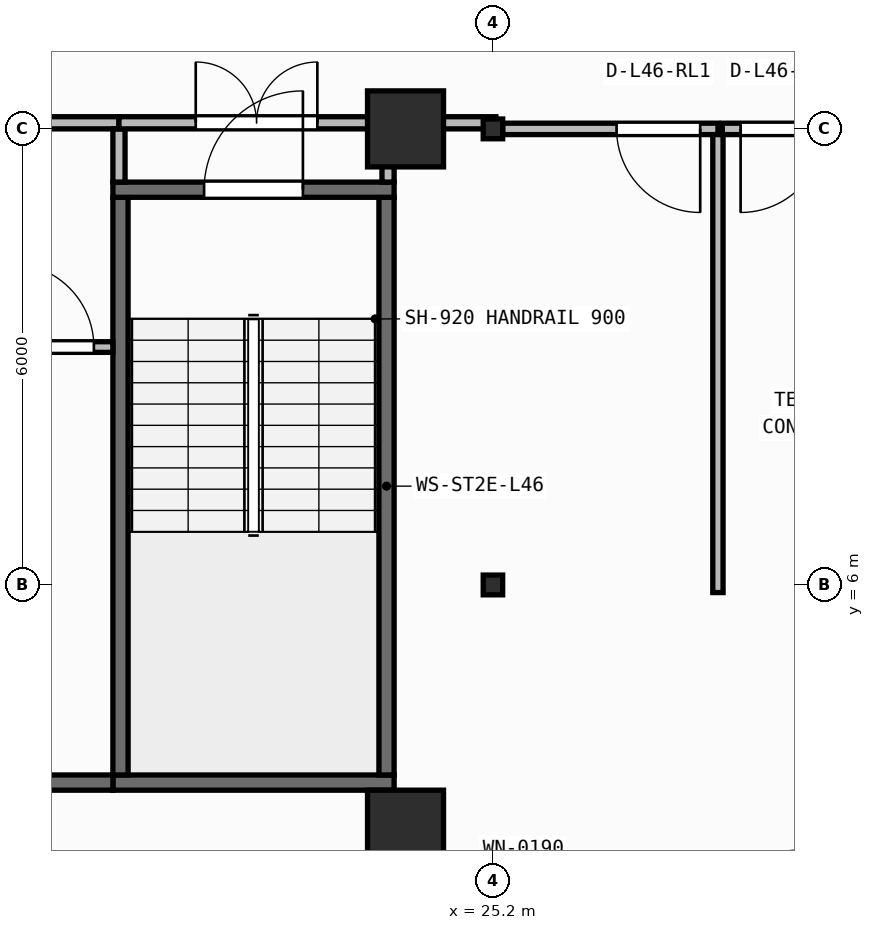
"""IFC4 building model, lengths in metres.
Left out: names, types, materials, properties, quantities, classifications, styles, units other than length and angle.
Written with IfcOpenShell. Run it as: python <this file> out.ifc"""

import sys

from ifc_helpers import new_model, si_unit, direction, frame, frame_2d, origin, origin_2d, place, context, subcontext, project, spatial, rectangle, i_section, extrude, element, fill, save


model = new_model("IFC4")
c1 = context("Model", 3, precision=1e-05, world=origin(), true_north=direction((0.0, 1.0)))
c2 = subcontext(c1, "Body", "Model", "MODEL_VIEW")
j1 = project(units=[si_unit("LENGTHUNIT", "METRE"), si_unit("PLANEANGLEUNIT", "RADIAN")], contexts=[c1])
p1 = place(None, origin())
s1 = spatial("IfcSite", under=j1, at=p1, CompositionType="ELEMENT")
p2 = place(p1, origin())
s2 = spatial("IfcBuilding", under=s1, at=p2, CompositionType="ELEMENT")
p3 = place(p2, frame((0.0, 0.0, 188.15)))
s3 = spatial("IfcBuildingStorey", under=s2, at=p3, CompositionType="ELEMENT", Elevation=188.15)
p4 = place(p3, frame((24.05, 2.8, 0.0), z_axis=(0.0, 0.0, 1.0), x_axis=(1.0, 0.0, 0.0)))
e1 = element("IfcColumn", 1, at=p4, inside=s3, PredefinedType="COLUMN", context=c2, shape_type="SweptSolid", body=[
    extrude(rectangle(XDim=1.0, YDim=1.0, at=origin_2d()), origin(), (0.0, 0.0, 1.0), 3.95),
])
p5 = place(p3, frame((25.2, 6.0, 0.0), z_axis=(0.0, 0.0, 1.0), x_axis=(1.0, 0.0, 0.0)))
e2 = element("IfcColumn", 2, at=p5, inside=s3, PredefinedType="COLUMN", context=c2, shape_type="SweptSolid", body=[
    extrude(i_section(OverallWidth=0.256, OverallDepth=0.26, WebThickness=0.01, FlangeThickness=0.017, FilletRadius=0.013, at=origin_2d()), origin(), (0.0, 0.0, 1.0), 3.95),
])
p6 = place(p3, frame((24.05, 12.0, 0.0), z_axis=(0.0, 0.0, 1.0), x_axis=(1.0, 0.0, 0.0)))
e3 = element("IfcColumn", 3, at=p6, inside=s3, PredefinedType="COLUMN", context=c2, shape_type="SweptSolid", body=[
    extrude(rectangle(XDim=1.0, YDim=1.0, at=origin_2d()), origin(), (0.0, 0.0, 1.0), 3.95),
])
p7 = place(p3, frame((25.2, 12.0, 0.0), z_axis=(0.0, 0.0, 1.0), x_axis=(1.0, 0.0, 0.0)))
e4 = element("IfcColumn", 4, at=p7, inside=s3, PredefinedType="COLUMN", context=c2, shape_type="SweptSolid", body=[
    extrude(i_section(OverallWidth=0.256, OverallDepth=0.26, WebThickness=0.01, FlangeThickness=0.017, FilletRadius=0.013, at=origin_2d()), origin(), (0.0, 0.0, 1.0), 3.95),
])
p8 = place(p3, frame((2.66, 0.174, 0.0), z_axis=(0.0, 0.0, 1.0), x_axis=(0.996634028439, 0.081979347142, 0.0)))
e5 = element("IfcWall", 5, at=p8, inside=s3, PredefinedType="STANDARD", context=c2, shape_type="SweptSolid", body=[
    extrude(rectangle(XDim=46.035, YDim=0.26, at=frame_2d((23.018, 0.0))), origin(), (0.0, 0.0, 1.0), 3.71),
])
p9 = place(p8, frame((21.817, 0.0, 0.9)))
e6 = element("IfcOpeningElement", 6, at=p9, cuts=e5, PredefinedType="OPENING", context=c2, shape_type="SweptSolid", body=[
    extrude(rectangle(XDim=2.4, YDim=1.65, at=frame_2d((1.2, 0.825))), frame((0.0, 0.14, 0.0), z_axis=(0.0, -1.0, 0.0), x_axis=(1.0, 0.0, 0.0)), (0.0, 0.0, 1.0), 0.28),
])
p10 = place(p3, frame((20.2, 3.4, 0.0), z_axis=(0.0, 0.0, 1.0), x_axis=(1.0, 0.0, 0.0)))
e7 = element("IfcWall", 7, at=p10, inside=s3, PredefinedType="SHEAR", context=c2, shape_type="SweptSolid", body=[
    extrude(rectangle(XDim=3.7, YDim=0.2, at=frame_2d((1.85, 0.0))), origin(), (0.0, 0.0, 1.0), 3.71),
])
for number, where, z_axis, x_axis in (
    (8, (20.3, 3.5, 0.0), (0.0, 0.0, 1.0), (0.0, 1.0, 0.0)),
    (9, (23.8, 3.5, 0.0), (0.0, 0.0, 1.0), (0.0, 1.0, 0.0)),
):
    element("IfcWall", number, at=place(p3, frame(where, z_axis=z_axis, x_axis=x_axis)), inside=s3, PredefinedType="SHEAR", context=c2, shape_type="SweptSolid", body=[
        extrude(rectangle(XDim=7.6, YDim=0.2, at=frame_2d((3.8, 0.0))), origin(), (0.0, 0.0, 1.0), 3.71),
    ])
p11 = place(p3, frame((20.2, 11.2, 0.0), z_axis=(0.0, 0.0, 1.0), x_axis=(1.0, 0.0, 0.0)))
e10 = element("IfcWall", 10, at=p11, inside=s3, PredefinedType="SHEAR", context=c2, shape_type="SweptSolid", body=[
    extrude(rectangle(XDim=3.7, YDim=0.2, at=frame_2d((1.85, 0.0))), origin(), (0.0, 0.0, 1.0), 3.71),
])
p12 = place(p11, frame((1.2, 0.0, 0.0)))
e11 = element("IfcOpeningElement", 11, at=p12, cuts=e10, PredefinedType="OPENING", context=c2, shape_type="SweptSolid", body=[
    extrude(rectangle(XDim=1.3, YDim=2.15, at=frame_2d((0.65, 1.075))), frame((0.0, 0.11, 0.0), z_axis=(0.0, -1.0, 0.0), x_axis=(1.0, 0.0, 0.0)), (0.0, 0.0, 1.0), 0.22),
])
p13 = place(p3, frame((6.5, 3.4, 0.0), z_axis=(0.0, 0.0, 1.0), x_axis=(1.0, 0.0, 0.0)))
e12 = element("IfcWall", 12, at=p13, inside=s3, PredefinedType="SHEAR", context=c2, shape_type="SweptSolid", body=[
    extrude(rectangle(XDim=13.7, YDim=0.2, at=frame_2d((6.85, 0.0))), origin(), (0.0, 0.0, 1.0), 3.71),
])
p14 = place(p3, frame((18.61, 9.13, 0.0), z_axis=(0.0, 0.0, 1.0), x_axis=(1.0, 0.0, 0.0)))
e13 = element("IfcWall", 13, at=p14, inside=s3, PredefinedType="PARTITIONING", context=c2, shape_type="SweptSolid", body=[
    extrude(rectangle(XDim=1.59, YDim=0.14, at=frame_2d((0.795, 0.0))), origin(), (0.0, 0.0, 1.0), 3.71),
])
p15 = place(p14, frame((0.24, 0.0, 0.0)))
e14 = element("IfcOpeningElement", 14, at=p15, cuts=e13, PredefinedType="OPENING", context=c2, shape_type="SweptSolid", body=[
    extrude(rectangle(XDim=1.1, YDim=2.1, at=frame_2d((0.55, 1.05))), frame((0.0, 0.08, 0.0), z_axis=(0.0, -1.0, 0.0), x_axis=(1.0, 0.0, 0.0)), (0.0, 0.0, 1.0), 0.16),
])
p16 = place(p3, frame((12.58, 12.08, 0.0), z_axis=(0.0, 0.0, 1.0), x_axis=(1.0, 0.0, 0.0)))
e15 = element("IfcWall", 15, at=p16, inside=s3, PredefinedType="PARTITIONING", context=c2, shape_type="SweptSolid", body=[
    extrude(rectangle(XDim=7.7, YDim=0.16, at=frame_2d((3.85, 0.0))), origin(), (0.0, 0.0, 1.0), 3.152),
])
p17 = place(p16, frame((3.05, 0.0, 0.0)))
e16 = element("IfcOpeningElement", 16, at=p17, cuts=e15, PredefinedType="OPENING", context=c2, shape_type="SweptSolid", body=[
    extrude(rectangle(XDim=1.6, YDim=2.05, at=frame_2d((0.8, 1.025))), frame((0.0, 0.09, 0.0), z_axis=(0.0, -1.0, 0.0), x_axis=(1.0, 0.0, 0.0)), (0.0, 0.0, 1.0), 0.18),
])
p18 = place(p3, frame((20.28, 11.3, 0.0), z_axis=(0.0, 0.0, 1.0), x_axis=(0.0, 1.0, 0.0)))
e17 = element("IfcWall", 17, at=p18, inside=s3, PredefinedType="PARTITIONING", context=c2, shape_type="SweptSolid", body=[
    extrude(rectangle(XDim=0.7, YDim=0.16, at=frame_2d((0.35, 0.0))), origin(), (0.0, 0.0, 1.0), 3.71),
])
p19 = place(p3, frame((20.28, 12.08, 0.0), z_axis=(0.0, 0.0, 1.0), x_axis=(1.0, 0.0, 0.0)))
e18 = element("IfcWall", 18, at=p19, inside=s3, PredefinedType="PARTITIONING", context=c2, shape_type="SweptSolid", body=[
    extrude(rectangle(XDim=3.62, YDim=0.16, at=frame_2d((1.81, 0.0))), origin(), (0.0, 0.0, 1.0), 3.152),
])
p20 = place(p19, frame((1.01, 0.0, 0.0)))
e19 = element("IfcOpeningElement", 19, at=p20, cuts=e18, PredefinedType="OPENING", context=c2, shape_type="SweptSolid", body=[
    extrude(rectangle(XDim=1.6, YDim=2.05, at=frame_2d((0.8, 1.025))), frame((0.0, 0.09, 0.0), z_axis=(0.0, -1.0, 0.0), x_axis=(1.0, 0.0, 0.0)), (0.0, 0.0, 1.0), 0.18),
])
p21 = place(p3, frame((23.82, 11.3, 0.0), z_axis=(0.0, 0.0, 1.0), x_axis=(0.0, 1.0, 0.0)))
e20 = element("IfcWall", 20, at=p21, inside=s3, PredefinedType="PARTITIONING", context=c2, shape_type="SweptSolid", body=[
    extrude(rectangle(XDim=0.7, YDim=0.16, at=frame_2d((0.35, 0.0))), origin(), (0.0, 0.0, 1.0), 3.71),
])
p22 = place(p3, frame((28.16, 5.9, 0.0), z_axis=(0.0, 0.0, 1.0), x_axis=(0.0, 1.0, 0.0)))
e21 = element("IfcWall", 21, at=p22, inside=s3, PredefinedType="PARTITIONING", context=c2, shape_type="SweptSolid", body=[
    extrude(rectangle(XDim=6.1, YDim=0.135, at=frame_2d((3.05, 0.0))), origin(), (0.0, 0.0, 1.0), 3.71),
])
p23 = place(p3, frame((28.16, 12.0, 0.0), z_axis=(0.0, 0.0, 1.0), x_axis=(-1.0, 0.0, 0.0)))
e22 = element("IfcWall", 22, at=p23, inside=s3, PredefinedType="PARTITIONING", context=c2, shape_type="SweptSolid", body=[
    extrude(rectangle(XDim=2.832, YDim=0.15, at=frame_2d((1.416, 0.0))), origin(), (0.0, 0.0, 1.0), 3.152),
])
p24 = place(p23, frame((0.233, 0.0, 0.0)))
e23 = element("IfcOpeningElement", 23, at=p24, cuts=e22, PredefinedType="OPENING", context=c2, shape_type="SweptSolid", body=[
    extrude(rectangle(XDim=1.1, YDim=2.1, at=frame_2d((0.55, 1.05))), frame((0.0, 0.085, 0.0), z_axis=(0.0, -1.0, 0.0), x_axis=(1.0, 0.0, 0.0)), (0.0, 0.0, 1.0), 0.17),
])
p25 = place(p3, frame((31.35, 12.0, 0.0), z_axis=(0.0, 0.0, 1.0), x_axis=(-1.0, 0.0, 0.0)))
e24 = element("IfcWall", 24, at=p25, inside=s3, PredefinedType="PARTITIONING", context=c2, shape_type="SweptSolid", body=[
    extrude(rectangle(XDim=3.133, YDim=0.15, at=frame_2d((1.566, 0.0))), origin(), (0.0, 0.0, 1.0), 3.152),
])
p26 = place(p25, frame((1.792, 0.0, 0.0)))
e25 = element("IfcOpeningElement", 25, at=p26, cuts=e24, PredefinedType="OPENING", context=c2, shape_type="SweptSolid", body=[
    extrude(rectangle(XDim=1.1, YDim=2.1, at=frame_2d((0.55, 1.05))), frame((0.0, 0.085, 0.0), z_axis=(0.0, -1.0, 0.0), x_axis=(1.0, 0.0, 0.0)), (0.0, 0.0, 1.0), 0.17),
])
p27 = place(p3, frame((24.02, 12.08, 0.0), z_axis=(0.0, 0.0, 1.0), x_axis=(1.0, 0.0, 0.0)))
e26 = element("IfcWall", 26, at=p27, inside=s3, PredefinedType="PARTITIONING", context=c2, shape_type="SweptSolid", body=[
    extrude(rectangle(XDim=1.219, YDim=0.16, at=frame_2d((0.609, 0.0))), origin(), (0.0, 0.0, 1.0), 3.152),
])
p28 = place(p12, origin())
e27 = element("IfcDoor", 27, at=p28, inside=s3, OperationType="SINGLE_SWING_RIGHT", PredefinedType="DOOR", context=c2, shape_type="SweptSolid", body=[
    extrude(rectangle(XDim=1.3, YDim=2.15, at=frame_2d((0.65, 1.075))), frame((0.0, 0.025, 0.0), z_axis=(0.0, -1.0, 0.0), x_axis=(1.0, 0.0, 0.0)), (0.0, 0.0, 1.0), 0.05),
])
fill(e11, e27)
p29 = place(p15, origin())
e28 = element("IfcDoor", 28, at=p29, inside=s3, OperationType="SINGLE_SWING_LEFT", PredefinedType="DOOR", context=c2, shape_type="SweptSolid", body=[
    extrude(rectangle(XDim=1.1, YDim=2.1, at=frame_2d((0.55, 1.05))), frame((0.0, 0.025, 0.0), z_axis=(0.0, -1.0, 0.0), x_axis=(1.0, 0.0, 0.0)), (0.0, 0.0, 1.0), 0.05),
])
fill(e14, e28)
p30 = place(p20, origin())
e29 = element("IfcDoor", 29, at=p30, inside=s3, OperationType="DOUBLE_DOOR_SINGLE_SWING", PredefinedType="DOOR", context=c2, shape_type="SweptSolid", body=[
    extrude(rectangle(XDim=1.6, YDim=2.05, at=frame_2d((0.8, 1.025))), frame((0.0, 0.025, 0.0), z_axis=(0.0, -1.0, 0.0), x_axis=(1.0, 0.0, 0.0)), (0.0, 0.0, 1.0), 0.05),
])
fill(e19, e29)
p31 = place(p24, origin())
e30 = element("IfcDoor", 30, at=p31, inside=s3, OperationType="SINGLE_SWING_LEFT", PredefinedType="DOOR", context=c2, shape_type="SweptSolid", body=[
    extrude(rectangle(XDim=1.1, YDim=2.1, at=frame_2d((0.55, 1.05))), frame((0.0, 0.025, 0.0), z_axis=(0.0, -1.0, 0.0), x_axis=(1.0, 0.0, 0.0)), (0.0, 0.0, 1.0), 0.05),
])
fill(e23, e30)
p32 = place(p26, origin())
e31 = element("IfcDoor", 31, at=p32, inside=s3, OperationType="SINGLE_SWING_RIGHT", PredefinedType="DOOR", context=c2, shape_type="SweptSolid", body=[
    extrude(rectangle(XDim=1.1, YDim=2.1, at=frame_2d((0.55, 1.05))), frame((0.0, 0.025, 0.0), z_axis=(0.0, -1.0, 0.0), x_axis=(1.0, 0.0, 0.0)), (0.0, 0.0, 1.0), 0.05),
])
fill(e25, e31)
save(model, sys.argv[1])
